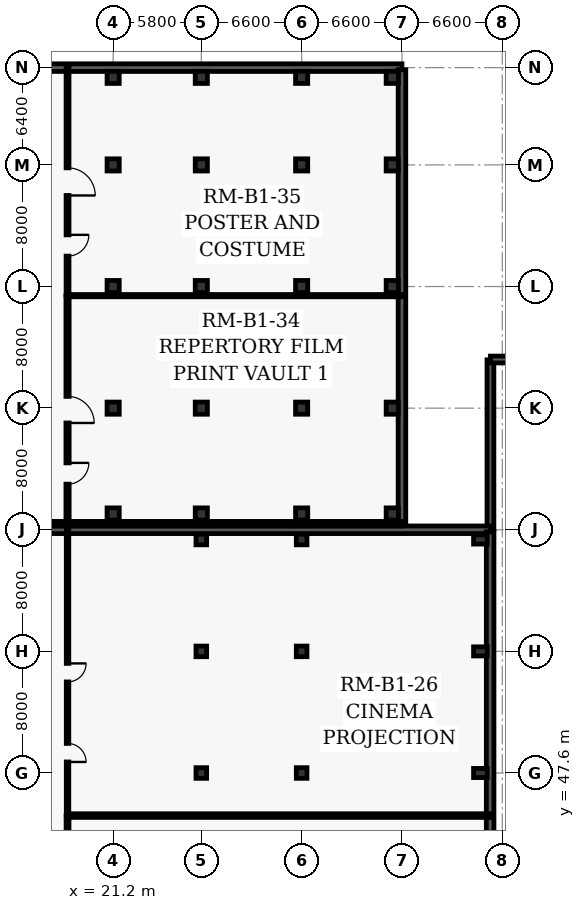
"""IFC4 building model, lengths in metres.
Left out: names, types, materials, properties, quantities, classifications, styles, units other than length and angle.
Written with IfcOpenShell. Run it as: python <this file> out.ifc"""

import sys

from ifc_helpers import new_model, si_unit, direction, frame, frame_2d, origin, origin_2d, place, context, subcontext, project, spatial, rectangle, extrude, element, fill, save


model = new_model("IFC4")
c1 = context("Model", 3, precision=1e-05, world=origin(), true_north=direction((0.0, 1.0)))
c2 = subcontext(c1, "Body", "Model", "MODEL_VIEW")
j1 = project(units=[si_unit("LENGTHUNIT", "METRE"), si_unit("PLANEANGLEUNIT", "RADIAN")], contexts=[c1])
p1 = place(None, origin())
s1 = spatial("IfcSite", under=j1, at=p1, CompositionType="ELEMENT")
p2 = place(p1, origin())
s2 = spatial("IfcBuilding", under=s1, at=p2, CompositionType="ELEMENT")
p3 = place(p2, frame((0.0, 0.0, -4.8)))
s3 = spatial("IfcBuildingStorey", under=s2, at=p3, CompositionType="ELEMENT", Elevation=-4.8)
for number, where, z_axis, x_axis in (
    (1, (27.0, 47.6, 0.0), (0.0, 0.0, 1.0), (1.0, 0.0, 0.0)),
    (2, (27.0, 55.6, 0.0), (0.0, 0.0, 1.0), (1.0, 0.0, 0.0)),
    (3, (27.0, 62.96, 0.0), (0.0, 0.0, 1.0), (1.0, 0.0, 0.0)),
    (4, (33.6, 47.6, 0.0), (0.0, 0.0, 1.0), (1.0, 0.0, 0.0)),
    (5, (33.6, 55.6, 0.0), (0.0, 0.0, 1.0), (1.0, 0.0, 0.0)),
    (6, (33.6, 62.96, 0.0), (0.0, 0.0, 1.0), (1.0, 0.0, 0.0)),
):
    element("IfcColumn", number, at=place(p3, frame(where, z_axis=z_axis, x_axis=x_axis)), inside=s3, PredefinedType="COLUMN", context=c2, shape_type="SweptSolid", body=[
        extrude(rectangle(XDim=0.7, YDim=0.7, at=origin_2d()), origin(), (0.0, 0.0, 1.0), 4.8),
    ])
for number, where, z_axis, x_axis in (
    (7, (45.36, 47.6, 0.0), (0.0, 0.0, 1.0), (1.0, 0.0, 0.0)),
    (8, (45.36, 55.6, 0.0), (0.0, 0.0, 1.0), (1.0, 0.0, 0.0)),
    (9, (45.36, 62.96, 0.0), (0.0, 0.0, 1.0), (1.0, 0.0, 0.0)),
):
    element("IfcColumn", number, at=place(p3, frame(where, z_axis=z_axis, x_axis=x_axis)), inside=s3, PredefinedType="COLUMN", context=c2, shape_type="SweptSolid", body=[
        extrude(rectangle(XDim=0.6, YDim=0.9, at=origin_2d()), origin(), (0.0, 0.0, 1.0), 4.8),
    ])
for number, where, z_axis, x_axis in (
    (10, (21.2, 64.64, 0.0), (0.0, 0.0, 1.0), (1.0, 0.0, 0.0)),
    (11, (21.2, 71.6, 0.0), (0.0, 0.0, 1.0), (1.0, 0.0, 0.0)),
    (12, (21.2, 79.6, 0.0), (0.0, 0.0, 1.0), (1.0, 0.0, 0.0)),
    (13, (21.2, 87.6, 0.0), (0.0, 0.0, 1.0), (1.0, 0.0, 0.0)),
    (14, (21.2, 93.36, 0.0), (0.0, 0.0, 1.0), (1.0, 0.0, 0.0)),
    (15, (27.0, 64.64, 0.0), (0.0, 0.0, 1.0), (1.0, 0.0, 0.0)),
    (16, (27.0, 71.6, 0.0), (0.0, 0.0, 1.0), (1.0, 0.0, 0.0)),
    (17, (27.0, 79.6, 0.0), (0.0, 0.0, 1.0), (1.0, 0.0, 0.0)),
    (18, (27.0, 87.6, 0.0), (0.0, 0.0, 1.0), (1.0, 0.0, 0.0)),
    (19, (27.0, 93.36, 0.0), (0.0, 0.0, 1.0), (1.0, 0.0, 0.0)),
    (20, (33.6, 64.64, 0.0), (0.0, 0.0, 1.0), (1.0, 0.0, 0.0)),
    (21, (33.6, 71.6, 0.0), (0.0, 0.0, 1.0), (1.0, 0.0, 0.0)),
    (22, (33.6, 79.6, 0.0), (0.0, 0.0, 1.0), (1.0, 0.0, 0.0)),
    (23, (33.6, 87.6, 0.0), (0.0, 0.0, 1.0), (1.0, 0.0, 0.0)),
    (24, (33.6, 93.36, 0.0), (0.0, 0.0, 1.0), (1.0, 0.0, 0.0)),
    (25, (39.56, 64.64, 0.0), (0.0, 0.0, 1.0), (1.0, 0.0, 0.0)),
    (26, (39.56, 71.6, 0.0), (0.0, 0.0, 1.0), (1.0, 0.0, 0.0)),
    (27, (39.56, 79.6, 0.0), (0.0, 0.0, 1.0), (1.0, 0.0, 0.0)),
    (28, (39.56, 87.6, 0.0), (0.0, 0.0, 1.0), (1.0, 0.0, 0.0)),
    (29, (39.56, 93.36, 0.0), (0.0, 0.0, 1.0), (1.0, 0.0, 0.0)),
):
    element("IfcColumn", number, at=place(p3, frame(where, z_axis=z_axis, x_axis=x_axis)), inside=s3, PredefinedType="COLUMN", context=c2, shape_type="SweptSolid", body=[
        extrude(rectangle(XDim=0.8, YDim=0.8, at=origin_2d()), origin(), (0.0, 0.0, 1.0), 4.8),
    ])
p4 = place(p3, frame((46.02, 63.62, 0.0), z_axis=(0.0, 0.0, 1.0), x_axis=(0.0, 1.0, 0.0)))
e30 = element("IfcWall", 30, at=p4, inside=s3, PredefinedType="USERDEFINED", context=c2, shape_type="SweptSolid", body=[
    extrude(rectangle(XDim=11.16, YDim=0.45, at=frame_2d((5.58, 0.0))), origin(), (0.0, 0.0, 1.0), 4.53),
])
p5 = place(p3, frame((46.02, 74.8, 0.0), z_axis=(0.0, 0.0, 1.0), x_axis=(1.0, 0.0, 0.0)))
e31 = element("IfcWall", 31, at=p5, inside=s3, PredefinedType="USERDEFINED", context=c2, shape_type="SweptSolid", body=[
    extrude(rectangle(XDim=8.76, YDim=0.45, at=frame_2d((4.38, 0.0))), origin(), (0.0, 0.0, 1.0), 4.53),
])
p6 = place(p3, frame((8.0, 63.6, 0.0), z_axis=(0.0, 0.0, 1.0), x_axis=(1.0, 0.0, 0.0)))
e32 = element("IfcWall", 32, at=p6, inside=s3, PredefinedType="USERDEFINED", context=c2, shape_type="SweptSolid", body=[
    extrude(rectangle(XDim=38.0, YDim=0.5, at=frame_2d((19.0, 0.0))), origin(), (0.0, 0.0, 1.0), 4.5),
])
p7 = place(p3, frame((46.0, 63.46, 0.0), z_axis=(0.0, 0.0, 1.0), x_axis=(0.0, -1.0, 0.0)))
e33 = element("IfcWall", 33, at=p7, inside=s3, PredefinedType="USERDEFINED", context=c2, shape_type="SweptSolid", body=[
    extrude(rectangle(XDim=55.72, YDim=0.5, at=frame_2d((27.86, 0.0))), origin(), (0.0, 0.0, 1.0), 4.5),
])
p8 = place(p3, frame((8.0, 94.0, 0.0), z_axis=(0.0, 0.0, 1.0), x_axis=(1.0, 0.0, 0.0)))
e34 = element("IfcWall", 34, at=p8, inside=s3, PredefinedType="USERDEFINED", context=c2, shape_type="SweptSolid", body=[
    extrude(rectangle(XDim=32.2, YDim=0.5, at=frame_2d((16.1, 0.0))), origin(), (0.0, 0.0, 1.0), 4.5),
])
p9 = place(p3, frame((40.2, 93.86, 0.0), z_axis=(0.0, 0.0, 1.0), x_axis=(0.0, -1.0, 0.0)))
e35 = element("IfcWall", 35, at=p9, inside=s3, PredefinedType="USERDEFINED", context=c2, shape_type="SweptSolid", body=[
    extrude(rectangle(XDim=29.72, YDim=0.5, at=frame_2d((14.86, 0.0))), origin(), (0.0, 0.0, 1.0), 4.5),
])
p10 = place(p3, frame((40.2, 64.0, 0.0), z_axis=(0.0, 0.0, 1.0), x_axis=(-1.0, 0.0, 0.0)))
e36 = element("IfcWall", 36, at=p10, inside=s3, PredefinedType="SHEAR", context=c2, shape_type="SweptSolid", body=[
    extrude(rectangle(XDim=32.2, YDim=0.3, at=frame_2d((16.1, 0.0))), origin(), (0.0, 0.0, 1.0), 4.5),
])
p11 = place(p3, frame((18.2, 44.8, 0.0), z_axis=(0.0, 0.0, 1.0), x_axis=(0.0, -1.0, 0.0)))
e37 = element("IfcWall", 37, at=p11, inside=s3, PredefinedType="PARTITIONING", context=c2, shape_type="SweptSolid", body=[
    extrude(rectangle(XDim=18.8, YDim=0.19, at=frame_2d((9.4, 0.0))), origin(), (0.0, 0.0, 1.0), 4.5),
])
p12 = place(p11, frame((8.81, 0.0, 0.0)))
e38 = element("IfcOpeningElement", 38, at=p12, cuts=e37, PredefinedType="OPENING", context=c2, shape_type="SweptSolid", body=[
    extrude(rectangle(XDim=1.18, YDim=2.15, at=frame_2d((0.59, 1.075))), frame((0.0, 0.105, 0.0), z_axis=(0.0, -1.0, 0.0), x_axis=(1.0, 0.0, 0.0)), (0.0, 0.0, 1.0), 0.21),
])
p13 = place(p11, frame((13.964, 0.0, 0.0)))
e39 = element("IfcOpeningElement", 39, at=p13, cuts=e37, PredefinedType="OPENING", context=c2, shape_type="SweptSolid", body=[
    extrude(rectangle(XDim=1.4, YDim=2.25, at=frame_2d((0.7, 1.125))), frame((0.0, 0.105, 0.0), z_axis=(0.0, -1.0, 0.0), x_axis=(1.0, 0.0, 0.0)), (0.0, 0.0, 1.0), 0.21),
])
p14 = place(p3, frame((18.2, 63.6, 0.0), z_axis=(0.0, 0.0, 1.0), x_axis=(0.0, -1.0, 0.0)))
e40 = element("IfcWall", 40, at=p14, inside=s3, PredefinedType="PARTITIONING", context=c2, shape_type="SweptSolid", body=[
    extrude(rectangle(XDim=18.8, YDim=0.165, at=frame_2d((9.4, 0.0))), origin(), (0.0, 0.0, 1.0), 4.5),
])
p15 = place(p14, frame((8.79, 0.0, 0.0)))
e41 = element("IfcOpeningElement", 41, at=p15, cuts=e40, PredefinedType="OPENING", context=c2, shape_type="SweptSolid", body=[
    extrude(rectangle(XDim=1.22, YDim=2.2, at=frame_2d((0.61, 1.1))), frame((0.0, 0.093, 0.0), z_axis=(0.0, -1.0, 0.0), x_axis=(1.0, 0.0, 0.0)), (0.0, 0.0, 1.0), 0.185),
])
p16 = place(p14, frame((14.054, 0.0, 0.0)))
e42 = element("IfcOpeningElement", 42, at=p16, cuts=e40, PredefinedType="OPENING", context=c2, shape_type="SweptSolid", body=[
    extrude(rectangle(XDim=1.22, YDim=2.2, at=frame_2d((0.61, 1.1))), frame((0.0, 0.093, 0.0), z_axis=(0.0, -1.0, 0.0), x_axis=(1.0, 0.0, 0.0)), (0.0, 0.0, 1.0), 0.185),
])
p17 = place(p3, frame((18.2, 44.8, 0.0), z_axis=(0.0, 0.0, 1.0), x_axis=(1.0, 0.0, 0.0)))
e43 = element("IfcWall", 43, at=p17, inside=s3, PredefinedType="PARTITIONING", context=c2, shape_type="SweptSolid", body=[
    extrude(rectangle(XDim=27.8, YDim=0.24, at=frame_2d((13.9, 0.0))), origin(), (0.0, 0.0, 1.0), 4.5),
])
p18 = place(p3, frame((18.2, 79.0, 0.0), z_axis=(0.0, 0.0, 1.0), x_axis=(0.0, -1.0, 0.0)))
e44 = element("IfcWall", 44, at=p18, inside=s3, PredefinedType="PARTITIONING", context=c2, shape_type="SweptSolid", body=[
    extrude(rectangle(XDim=15.0, YDim=0.21, at=frame_2d((7.5, 0.0))), origin(), (0.0, 0.0, 1.0), 4.5),
])
p19 = place(p18, frame((6.625, 0.0, 0.0)))
e45 = element("IfcOpeningElement", 45, at=p19, cuts=e44, PredefinedType="OPENING", context=c2, shape_type="SweptSolid", body=[
    extrude(rectangle(XDim=1.75, YDim=2.35, at=frame_2d((0.875, 1.175))), frame((0.0, 0.115, 0.0), z_axis=(0.0, -1.0, 0.0), x_axis=(1.0, 0.0, 0.0)), (0.0, 0.0, 1.0), 0.23),
])
p20 = place(p18, frame((11.0, 0.0, 0.0)))
e46 = element("IfcOpeningElement", 46, at=p20, cuts=e44, PredefinedType="OPENING", context=c2, shape_type="SweptSolid", body=[
    extrude(rectangle(XDim=1.4, YDim=2.25, at=frame_2d((0.7, 1.125))), frame((0.0, 0.115, 0.0), z_axis=(0.0, -1.0, 0.0), x_axis=(1.0, 0.0, 0.0)), (0.0, 0.0, 1.0), 0.23),
])
p21 = place(p3, frame((18.2, 94.0, 0.0), z_axis=(0.0, 0.0, 1.0), x_axis=(0.0, -1.0, 0.0)))
e47 = element("IfcWall", 47, at=p21, inside=s3, PredefinedType="PARTITIONING", context=c2, shape_type="SweptSolid", body=[
    extrude(rectangle(XDim=15.0, YDim=0.19, at=frame_2d((7.5, 0.0))), origin(), (0.0, 0.0, 1.0), 4.5),
])
p22 = place(p21, frame((6.59, 0.0, 0.0)))
e48 = element("IfcOpeningElement", 48, at=p22, cuts=e47, PredefinedType="OPENING", context=c2, shape_type="SweptSolid", body=[
    extrude(rectangle(XDim=1.82, YDim=2.35, at=frame_2d((0.91, 1.175))), frame((0.0, 0.105, 0.0), z_axis=(0.0, -1.0, 0.0), x_axis=(1.0, 0.0, 0.0)), (0.0, 0.0, 1.0), 0.21),
])
p23 = place(p21, frame((11.0, 0.0, 0.0)))
e49 = element("IfcOpeningElement", 49, at=p23, cuts=e47, PredefinedType="OPENING", context=c2, shape_type="SweptSolid", body=[
    extrude(rectangle(XDim=1.4, YDim=2.25, at=frame_2d((0.7, 1.125))), frame((0.0, 0.105, 0.0), z_axis=(0.0, -1.0, 0.0), x_axis=(1.0, 0.0, 0.0)), (0.0, 0.0, 1.0), 0.21),
])
p24 = place(p3, frame((18.2, 79.0, 0.0), z_axis=(0.0, 0.0, 1.0), x_axis=(1.0, 0.0, 0.0)))
e50 = element("IfcWall", 50, at=p24, inside=s3, PredefinedType="PARTITIONING", context=c2, shape_type="SweptSolid", body=[
    extrude(rectangle(XDim=22.0, YDim=0.15, at=frame_2d((11.0, 0.0))), origin(), (0.0, 0.0, 1.0), 4.5),
])
p25 = place(p15, origin())
e51 = element("IfcDoor", 51, at=p25, inside=s3, OperationType="SINGLE_SWING_LEFT", PredefinedType="DOOR", context=c2, shape_type="SweptSolid", body=[
    extrude(rectangle(XDim=1.22, YDim=2.2, at=frame_2d((0.61, 1.1))), frame((0.0, 0.025, 0.0), z_axis=(0.0, -1.0, 0.0), x_axis=(1.0, 0.0, 0.0)), (0.0, 0.0, 1.0), 0.05),
])
fill(e41, e51)
p26 = place(p16, origin())
e52 = element("IfcDoor", 52, at=p26, inside=s3, OperationType="SINGLE_SWING_RIGHT", PredefinedType="DOOR", context=c2, shape_type="SweptSolid", body=[
    extrude(rectangle(XDim=1.22, YDim=2.2, at=frame_2d((0.61, 1.1))), frame((0.0, 0.025, 0.0), z_axis=(0.0, -1.0, 0.0), x_axis=(1.0, 0.0, 0.0)), (0.0, 0.0, 1.0), 0.05),
])
fill(e42, e52)
p27 = place(p19, origin())
e53 = element("IfcDoor", 53, at=p27, inside=s3, OperationType="SINGLE_SWING_RIGHT", PredefinedType="DOOR", context=c2, shape_type="SweptSolid", body=[
    extrude(rectangle(XDim=1.75, YDim=2.35, at=frame_2d((0.875, 1.175))), frame((0.0, 0.025, 0.0), z_axis=(0.0, -1.0, 0.0), x_axis=(1.0, 0.0, 0.0)), (0.0, 0.0, 1.0), 0.05),
])
fill(e45, e53)
p28 = place(p20, origin())
e54 = element("IfcDoor", 54, at=p28, inside=s3, OperationType="SINGLE_SWING_LEFT", PredefinedType="DOOR", context=c2, shape_type="SweptSolid", body=[
    extrude(rectangle(XDim=1.4, YDim=2.25, at=frame_2d((0.7, 1.125))), frame((0.0, 0.025, 0.0), z_axis=(0.0, -1.0, 0.0), x_axis=(1.0, 0.0, 0.0)), (0.0, 0.0, 1.0), 0.05),
])
fill(e46, e54)
p29 = place(p22, origin())
e55 = element("IfcDoor", 55, at=p29, inside=s3, OperationType="SINGLE_SWING_RIGHT", PredefinedType="DOOR", context=c2, shape_type="SweptSolid", body=[
    extrude(rectangle(XDim=1.82, YDim=2.35, at=frame_2d((0.91, 1.175))), frame((0.0, 0.025, 0.0), z_axis=(0.0, -1.0, 0.0), x_axis=(1.0, 0.0, 0.0)), (0.0, 0.0, 1.0), 0.05),
])
fill(e48, e55)
p30 = place(p23, origin())
e56 = element("IfcDoor", 56, at=p30, inside=s3, OperationType="SINGLE_SWING_LEFT", PredefinedType="DOOR", context=c2, shape_type="SweptSolid", body=[
    extrude(rectangle(XDim=1.4, YDim=2.25, at=frame_2d((0.7, 1.125))), frame((0.0, 0.025, 0.0), z_axis=(0.0, -1.0, 0.0), x_axis=(1.0, 0.0, 0.0)), (0.0, 0.0, 1.0), 0.05),
])
fill(e49, e56)
save(model, sys.argv[1])
